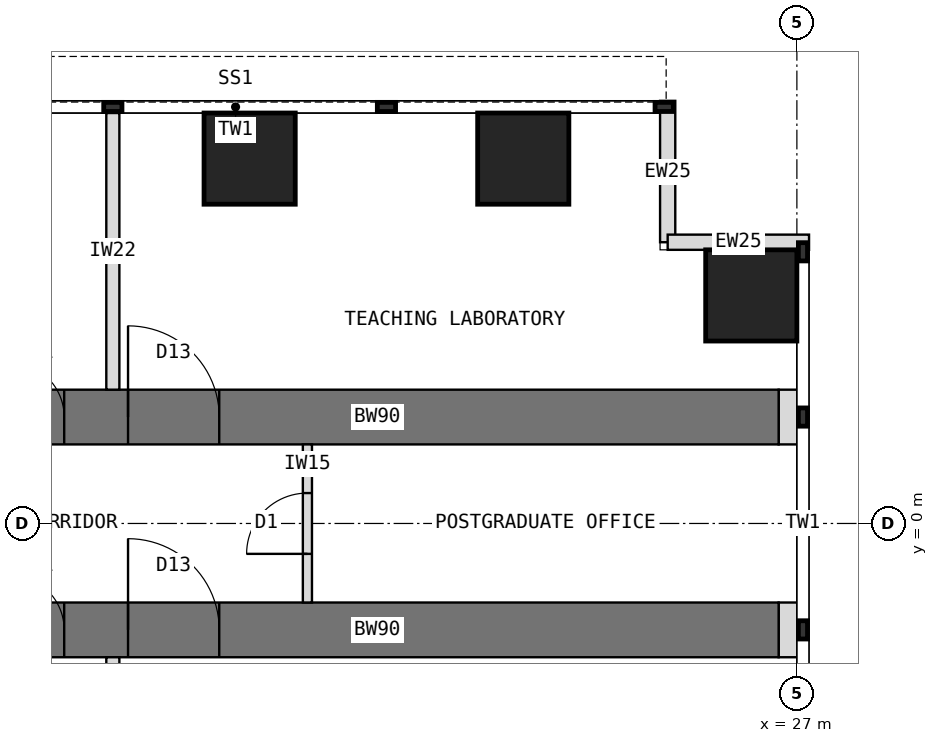
"""IFC4 building model, lengths in metres.
Left out: names, types, materials, properties, quantities, classifications, styles, units other than length and angle.
Written with IfcOpenShell. Run it as: python <this file> out.ifc"""

import sys

from ifc_helpers import new_model, si_unit, direction, frame, frame_2d, origin, origin_2d, place, context, subcontext, project, spatial, rectangle, extrude, element, fill, save


model = new_model("IFC4")
c1 = context("Model", 3, precision=1e-05, world=origin(), true_north=direction((0.0, 1.0)))
c2 = subcontext(c1, "Body", "Model", "MODEL_VIEW")
j1 = project(units=[si_unit("LENGTHUNIT", "METRE"), si_unit("PLANEANGLEUNIT", "RADIAN")], contexts=[c1])
p1 = place(None, origin())
s1 = spatial("IfcSite", under=j1, at=p1, CompositionType="ELEMENT")
p2 = place(p1, origin())
s2 = spatial("IfcBuilding", under=s1, at=p2, CompositionType="ELEMENT")
p3 = place(p2, frame((0.0, 0.0, 28.5)))
s3 = spatial("IfcBuildingStorey", under=s2, at=p3, CompositionType="ELEMENT", Elevation=28.5)
p4 = place(p3, frame((13.5, 1.75, 0.0), z_axis=(0.0, 0.0, 1.0), x_axis=(1.0, 0.0, 0.0)))
e1 = element("IfcWall", 1, at=p4, inside=s3, PredefinedType="SHEAR", context=c2, shape_type="SweptSolid", body=[
    extrude(rectangle(XDim=13.2, YDim=0.9, at=frame_2d((6.6, 0.0))), origin(), (0.0, 0.0, 1.0), 4.0),
])
p5 = place(p4, frame((0.55, 0.0, 0.0)))
e2 = element("IfcOpeningElement", 2, at=p5, cuts=e1, PredefinedType="OPENING", context=c2, shape_type="SweptSolid", body=[
    extrude(rectangle(XDim=0.9, YDim=2.1, at=frame_2d((0.45, 1.05))), frame((0.0, 0.46, 0.0), z_axis=(0.0, -1.0, 0.0), x_axis=(1.0, 0.0, 0.0)), (0.0, 0.0, 1.0), 0.92),
])
p6 = place(p4, frame((2.5, 0.0, 0.0)))
e3 = element("IfcOpeningElement", 3, at=p6, cuts=e1, PredefinedType="OPENING", context=c2, shape_type="SweptSolid", body=[
    extrude(rectangle(XDim=1.5, YDim=2.1, at=frame_2d((0.75, 1.05))), frame((0.0, 0.46, 0.0), z_axis=(0.0, -1.0, 0.0), x_axis=(1.0, 0.0, 0.0)), (0.0, 0.0, 1.0), 0.92),
])
p7 = place(p3, frame((13.5, -1.75, 0.0), z_axis=(0.0, 0.0, 1.0), x_axis=(1.0, 0.0, 0.0)))
e4 = element("IfcWall", 4, at=p7, inside=s3, PredefinedType="SHEAR", context=c2, shape_type="SweptSolid", body=[
    extrude(rectangle(XDim=13.2, YDim=0.9, at=frame_2d((6.6, 0.0))), origin(), (0.0, 0.0, 1.0), 4.0),
])
p8 = place(p7, frame((0.55, 0.0, 0.0)))
e5 = element("IfcOpeningElement", 5, at=p8, cuts=e4, PredefinedType="OPENING", context=c2, shape_type="SweptSolid", body=[
    extrude(rectangle(XDim=0.9, YDim=2.1, at=frame_2d((0.45, 1.05))), frame((0.0, 0.46, 0.0), z_axis=(0.0, -1.0, 0.0), x_axis=(1.0, 0.0, 0.0)), (0.0, 0.0, 1.0), 0.92),
])
p9 = place(p7, frame((2.5, 0.0, 0.0)))
e6 = element("IfcOpeningElement", 6, at=p9, cuts=e4, PredefinedType="OPENING", context=c2, shape_type="SweptSolid", body=[
    extrude(rectangle(XDim=1.5, YDim=2.1, at=frame_2d((0.75, 1.05))), frame((0.0, 0.46, 0.0), z_axis=(0.0, -1.0, 0.0), x_axis=(1.0, 0.0, 0.0)), (0.0, 0.0, 1.0), 0.92),
])
for number, where, z_axis, x_axis in (
    (7, (18.0, 6.0, 0.0), (0.0, 0.0, 1.0), (1.0, 0.0, 0.0)),
    (8, (22.5, 6.0, 0.0), (0.0, 0.0, 1.0), (1.0, 0.0, 0.0)),
    (9, (26.25, 3.75, 0.0), (0.0, 0.0, 1.0), (1.0, 0.0, 0.0)),
):
    element("IfcColumn", number, at=place(p3, frame(where, z_axis=z_axis, x_axis=x_axis)), inside=s3, PredefinedType="COLUMN", context=c2, shape_type="SweptSolid", body=[
        extrude(rectangle(XDim=1.5, YDim=1.5, at=origin_2d()), origin(), (0.0, 0.0, 1.0), 4.0),
    ])
for number, where, z_axis, x_axis in (
    (10, (24.875, 6.95, 0.0), (0.0, 0.0, 1.0), (0.0, -1.0, 0.0)),
    (11, (24.875, 4.625, 0.0), (0.0, 0.0, 1.0), (1.0, 0.0, 0.0)),
):
    element("IfcWall", number, at=place(p3, frame(where, z_axis=z_axis, x_axis=x_axis)), inside=s3, PredefinedType="STANDARD", context=c2, shape_type="SweptSolid", body=[
        extrude(rectangle(XDim=2.325, YDim=0.25, at=frame_2d((1.163, 0.0))), origin(), (0.0, 0.0, 1.0), 3.8),
    ])
for number, where, z_axis, x_axis in (
    (12, (26.7, 1.75, 0.0), (0.0, 0.0, 1.0), (1.0, 0.0, 0.0)),
    (13, (26.7, -1.75, 0.0), (0.0, 0.0, 1.0), (1.0, 0.0, 0.0)),
):
    element("IfcWall", number, at=place(p3, frame(where, z_axis=z_axis, x_axis=x_axis)), inside=s3, PredefinedType="PARTITIONING", context=c2, shape_type="SweptSolid", body=[
        extrude(rectangle(XDim=0.31, YDim=0.9, at=frame_2d((0.155, 0.0))), origin(), (0.0, 0.0, 1.0), 3.8),
    ])
for number, where, z_axis, x_axis in (
    (14, (15.75, 2.2, 0.0), (0.0, 0.0, 1.0), (0.0, 1.0, 0.0)),
    (15, (15.75, -2.2, 0.0), (0.0, 0.0, 1.0), (0.0, -1.0, 0.0)),
):
    element("IfcWall", number, at=place(p3, frame(where, z_axis=z_axis, x_axis=x_axis)), inside=s3, PredefinedType="PARTITIONING", context=c2, shape_type="SweptSolid", body=[
        extrude(rectangle(XDim=4.55, YDim=0.215, at=frame_2d((2.275, 0.0))), origin(), (0.0, 0.0, 1.0), 3.8),
    ])
p10 = place(p3, frame((18.95, -1.3, 0.0), z_axis=(0.0, 0.0, 1.0), x_axis=(0.0, 1.0, 0.0)))
e16 = element("IfcWall", 16, at=p10, inside=s3, PredefinedType="PARTITIONING", context=c2, shape_type="SweptSolid", body=[
    extrude(rectangle(XDim=2.6, YDim=0.15, at=frame_2d((1.3, 0.0))), origin(), (0.0, 0.0, 1.0), 3.8),
])
p11 = place(p10, frame((0.8, 0.0, 0.0)))
e17 = element("IfcOpeningElement", 17, at=p11, cuts=e16, PredefinedType="OPENING", context=c2, shape_type="SweptSolid", body=[
    extrude(rectangle(XDim=1.0, YDim=2.1, at=frame_2d((0.5, 1.05))), frame((0.0, 0.085, 0.0), z_axis=(0.0, -1.0, 0.0), x_axis=(1.0, 0.0, 0.0)), (0.0, 0.0, 1.0), 0.17),
])
p12 = place(p11, origin())
e18 = element("IfcDoor", 18, at=p12, inside=s3, OperationType="SINGLE_SWING_LEFT", PredefinedType="DOOR", context=c2, shape_type="SweptSolid", body=[
    extrude(rectangle(XDim=1.0, YDim=2.1, at=frame_2d((0.5, 1.05))), frame((0.0, 0.025, 0.0), z_axis=(0.0, -1.0, 0.0), x_axis=(1.0, 0.0, 0.0)), (0.0, 0.0, 1.0), 0.05),
])
fill(e17, e18)
p13 = place(p5, origin())
e19 = element("IfcDoor", 19, at=p13, inside=s3, OperationType="SINGLE_SWING_LEFT", PredefinedType="DOOR", context=c2, shape_type="SweptSolid", body=[
    extrude(rectangle(XDim=0.82, YDim=2.06, at=frame_2d((0.45, 1.03))), frame((0.0, 0.025, 0.0), z_axis=(0.0, -1.0, 0.0), x_axis=(1.0, 0.0, 0.0)), (0.0, 0.0, 1.0), 0.05),
    extrude(rectangle(XDim=0.04, YDim=2.1, at=frame_2d((0.02, 1.05))), frame((0.0, 0.45, 0.0), z_axis=(0.0, -1.0, 0.0), x_axis=(1.0, 0.0, 0.0)), (0.0, 0.0, 1.0), 0.899),
    extrude(rectangle(XDim=0.04, YDim=2.1, at=frame_2d((0.88, 1.05))), frame((0.0, 0.45, 0.0), z_axis=(0.0, -1.0, 0.0), x_axis=(1.0, 0.0, 0.0)), (0.0, 0.0, 1.0), 0.899),
    extrude(rectangle(XDim=0.82, YDim=0.04, at=frame_2d((0.45, 2.08))), frame((0.0, 0.45, 0.0), z_axis=(0.0, -1.0, 0.0), x_axis=(1.0, 0.0, 0.0)), (0.0, 0.0, 1.0), 0.899),
])
fill(e2, e19)
p14 = place(p6, origin())
e20 = element("IfcDoor", 20, at=p14, inside=s3, OperationType="DOUBLE_DOOR_SINGLE_SWING", PredefinedType="DOOR", context=c2, shape_type="SweptSolid", body=[
    extrude(rectangle(XDim=1.42, YDim=2.06, at=frame_2d((0.75, 1.03))), frame((0.0, 0.025, 0.0), z_axis=(0.0, -1.0, 0.0), x_axis=(1.0, 0.0, 0.0)), (0.0, 0.0, 1.0), 0.05),
    extrude(rectangle(XDim=0.04, YDim=2.1, at=frame_2d((0.02, 1.05))), frame((0.0, 0.45, 0.0), z_axis=(0.0, -1.0, 0.0), x_axis=(1.0, 0.0, 0.0)), (0.0, 0.0, 1.0), 0.899),
    extrude(rectangle(XDim=0.04, YDim=2.1, at=frame_2d((1.48, 1.05))), frame((0.0, 0.45, 0.0), z_axis=(0.0, -1.0, 0.0), x_axis=(1.0, 0.0, 0.0)), (0.0, 0.0, 1.0), 0.899),
    extrude(rectangle(XDim=1.42, YDim=0.04, at=frame_2d((0.75, 2.08))), frame((0.0, 0.45, 0.0), z_axis=(0.0, -1.0, 0.0), x_axis=(1.0, 0.0, 0.0)), (0.0, 0.0, 1.0), 0.899),
])
fill(e3, e20)
p15 = place(p8, origin())
e21 = element("IfcDoor", 21, at=p15, inside=s3, OperationType="SINGLE_SWING_LEFT", PredefinedType="DOOR", context=c2, shape_type="SweptSolid", body=[
    extrude(rectangle(XDim=0.82, YDim=2.06, at=frame_2d((0.45, 1.03))), frame((0.0, 0.025, 0.0), z_axis=(0.0, -1.0, 0.0), x_axis=(1.0, 0.0, 0.0)), (0.0, 0.0, 1.0), 0.05),
    extrude(rectangle(XDim=0.04, YDim=2.1, at=frame_2d((0.02, 1.05))), frame((0.0, 0.45, 0.0), z_axis=(0.0, -1.0, 0.0), x_axis=(1.0, 0.0, 0.0)), (0.0, 0.0, 1.0), 0.899),
    extrude(rectangle(XDim=0.04, YDim=2.1, at=frame_2d((0.88, 1.05))), frame((0.0, 0.45, 0.0), z_axis=(0.0, -1.0, 0.0), x_axis=(1.0, 0.0, 0.0)), (0.0, 0.0, 1.0), 0.899),
    extrude(rectangle(XDim=0.82, YDim=0.04, at=frame_2d((0.45, 2.08))), frame((0.0, 0.45, 0.0), z_axis=(0.0, -1.0, 0.0), x_axis=(1.0, 0.0, 0.0)), (0.0, 0.0, 1.0), 0.899),
])
fill(e5, e21)
p16 = place(p9, origin())
e22 = element("IfcDoor", 22, at=p16, inside=s3, OperationType="DOUBLE_DOOR_SINGLE_SWING", PredefinedType="DOOR", context=c2, shape_type="SweptSolid", body=[
    extrude(rectangle(XDim=1.42, YDim=2.06, at=frame_2d((0.75, 1.03))), frame((0.0, 0.025, 0.0), z_axis=(0.0, -1.0, 0.0), x_axis=(1.0, 0.0, 0.0)), (0.0, 0.0, 1.0), 0.05),
    extrude(rectangle(XDim=0.04, YDim=2.1, at=frame_2d((0.02, 1.05))), frame((0.0, 0.45, 0.0), z_axis=(0.0, -1.0, 0.0), x_axis=(1.0, 0.0, 0.0)), (0.0, 0.0, 1.0), 0.899),
    extrude(rectangle(XDim=0.04, YDim=2.1, at=frame_2d((1.48, 1.05))), frame((0.0, 0.45, 0.0), z_axis=(0.0, -1.0, 0.0), x_axis=(1.0, 0.0, 0.0)), (0.0, 0.0, 1.0), 0.899),
    extrude(rectangle(XDim=1.42, YDim=0.04, at=frame_2d((0.75, 2.08))), frame((0.0, 0.45, 0.0), z_axis=(0.0, -1.0, 0.0), x_axis=(1.0, 0.0, 0.0)), (0.0, 0.0, 1.0), 0.899),
])
fill(e6, e22)
save(model, sys.argv[1])
